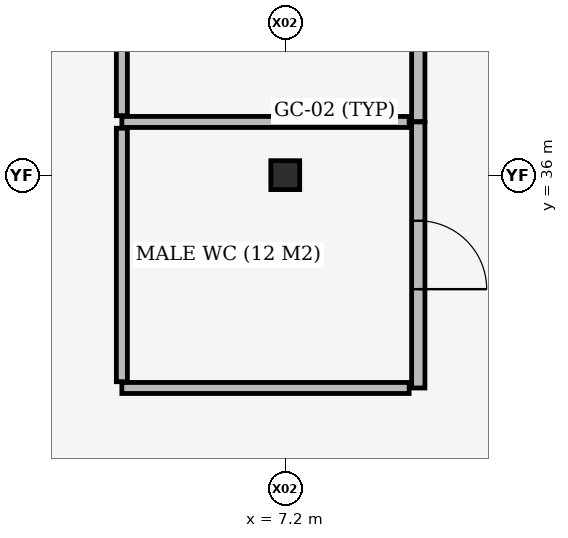
"""IFC4 building model, lengths in metres.
Left out: names, types, materials, properties, quantities, classifications, styles, units other than length and angle.
Written with IfcOpenShell. Run it as: python <this file> out.ifc"""

import sys

from ifc_helpers import new_model, si_unit, direction, frame, frame_2d, origin, origin_2d, place, context, subcontext, project, spatial, rectangle, extrude, element, fill, save


model = new_model("IFC4")
c1 = context("Model", 3, precision=1e-05, world=origin(), true_north=direction((0.0, 1.0)))
c2 = subcontext(c1, "Body", "Model", "MODEL_VIEW")
j1 = project(units=[si_unit("LENGTHUNIT", "METRE"), si_unit("PLANEANGLEUNIT", "RADIAN")], contexts=[c1])
p1 = place(None, origin())
s1 = spatial("IfcSite", under=j1, at=p1, CompositionType="ELEMENT")
p2 = place(p1, origin())
s2 = spatial("IfcBuilding", under=s1, at=p2, CompositionType="ELEMENT")
p3 = place(p2, frame((0.0, 0.0, 9.6)))
s3 = spatial("IfcBuildingStorey", under=s2, at=p3, CompositionType="ELEMENT", Elevation=9.6)
p4 = place(p3, frame((7.2, 36.0, 0.0), z_axis=(0.0, 0.0, 1.0), x_axis=(1.0, 0.0, 0.0)))
e1 = element("IfcColumn", 1, at=p4, inside=s3, PredefinedType="COLUMN", context=c2, shape_type="SweptSolid", body=[
    extrude(rectangle(XDim=0.38, YDim=0.38, at=origin_2d()), origin(), (0.0, 0.0, 1.0), 3.89),
])
p5 = place(p3, frame((8.95, 33.2, 0.0), z_axis=(0.0, 0.0, 1.0), x_axis=(0.0, 1.0, 0.0)))
e2 = element("IfcWall", 2, at=p5, inside=s3, PredefinedType="PLUMBINGWALL", context=c2, shape_type="SweptSolid", body=[
    extrude(rectangle(XDim=3.5, YDim=0.175, at=frame_2d((1.75, 0.0))), origin(), (0.0, 0.0, 1.0), 3.37),
])
p6 = place(p5, frame((1.3, 0.0, 0.0)))
e3 = element("IfcOpeningElement", 3, at=p6, cuts=e2, PredefinedType="OPENING", context=c2, shape_type="SweptSolid", body=[
    extrude(rectangle(XDim=0.9, YDim=2.1, at=frame_2d((0.45, 1.05))), frame((0.0, 0.097, 0.0), z_axis=(0.0, -1.0, 0.0), x_axis=(1.0, 0.0, 0.0)), (0.0, 0.0, 1.0), 0.195),
])
p7 = place(p3, frame((5.05, 33.2, 0.0), z_axis=(0.0, 0.0, 1.0), x_axis=(1.0, 0.0, 0.0)))
e4 = element("IfcWall", 4, at=p7, inside=s3, PredefinedType="PLUMBINGWALL", context=c2, shape_type="SweptSolid", body=[
    extrude(rectangle(XDim=3.78, YDim=0.145, at=frame_2d((1.89, 0.0))), origin(), (0.0, 0.0, 1.0), 3.31),
])
p8 = place(p3, frame((5.05, 36.7, 0.0), z_axis=(0.0, 0.0, 1.0), x_axis=(1.0, 0.0, 0.0)))
e5 = element("IfcWall", 5, at=p8, inside=s3, PredefinedType="PLUMBINGWALL", context=c2, shape_type="SweptSolid", body=[
    extrude(rectangle(XDim=3.78, YDim=0.145, at=frame_2d((1.89, 0.0))), origin(), (0.0, 0.0, 1.0), 3.25),
])
p9 = place(p3, frame((5.05, 33.282, 0.0), z_axis=(0.0, 0.0, 1.0), x_axis=(0.0, 1.0, 0.0)))
e6 = element("IfcWall", 6, at=p9, inside=s3, PredefinedType="PLUMBINGWALL", context=c2, shape_type="SweptSolid", body=[
    extrude(rectangle(XDim=3.335, YDim=0.145, at=frame_2d((1.667, 0.0))), origin(), (0.0, 0.0, 1.0), 3.15),
])
p10 = place(p3, frame((8.95, 36.705, 0.0), z_axis=(0.0, 0.0, 1.0), x_axis=(0.0, 1.0, 0.0)))
e7 = element("IfcWall", 7, at=p10, inside=s3, PredefinedType="PLUMBINGWALL", context=c2, shape_type="SweptSolid", body=[
    extrude(rectangle(XDim=3.495, YDim=0.175, at=frame_2d((1.748, 0.0))), origin(), (0.0, 0.0, 1.0), 3.89),
])
p11 = place(p10, frame((1.298, 0.0, 0.0)))
e8 = element("IfcOpeningElement", 8, at=p11, cuts=e7, PredefinedType="OPENING", context=c2, shape_type="SweptSolid", body=[
    extrude(rectangle(XDim=0.9, YDim=2.1, at=frame_2d((0.45, 1.05))), frame((0.0, 0.097, 0.0), z_axis=(0.0, -1.0, 0.0), x_axis=(1.0, 0.0, 0.0)), (0.0, 0.0, 1.0), 0.195),
])
p12 = place(p3, frame((5.05, 36.782, 0.0), z_axis=(0.0, 0.0, 1.0), x_axis=(0.0, 1.0, 0.0)))
e9 = element("IfcWall", 9, at=p12, inside=s3, PredefinedType="PLUMBINGWALL", context=c2, shape_type="SweptSolid", body=[
    extrude(rectangle(XDim=3.335, YDim=0.145, at=frame_2d((1.667, 0.0))), origin(), (0.0, 0.0, 1.0), 3.89),
])
p13 = place(p6, origin())
e10 = element("IfcDoor", 10, at=p13, inside=s3, OperationType="SINGLE_SWING_RIGHT", PredefinedType="DOOR", context=c2, shape_type="SweptSolid", body=[
    extrude(rectangle(XDim=0.9, YDim=2.1, at=frame_2d((0.45, 1.05))), frame((0.0, 0.025, 0.0), z_axis=(0.0, -1.0, 0.0), x_axis=(1.0, 0.0, 0.0)), (0.0, 0.0, 1.0), 0.05),
])
fill(e3, e10)
save(model, sys.argv[1])
